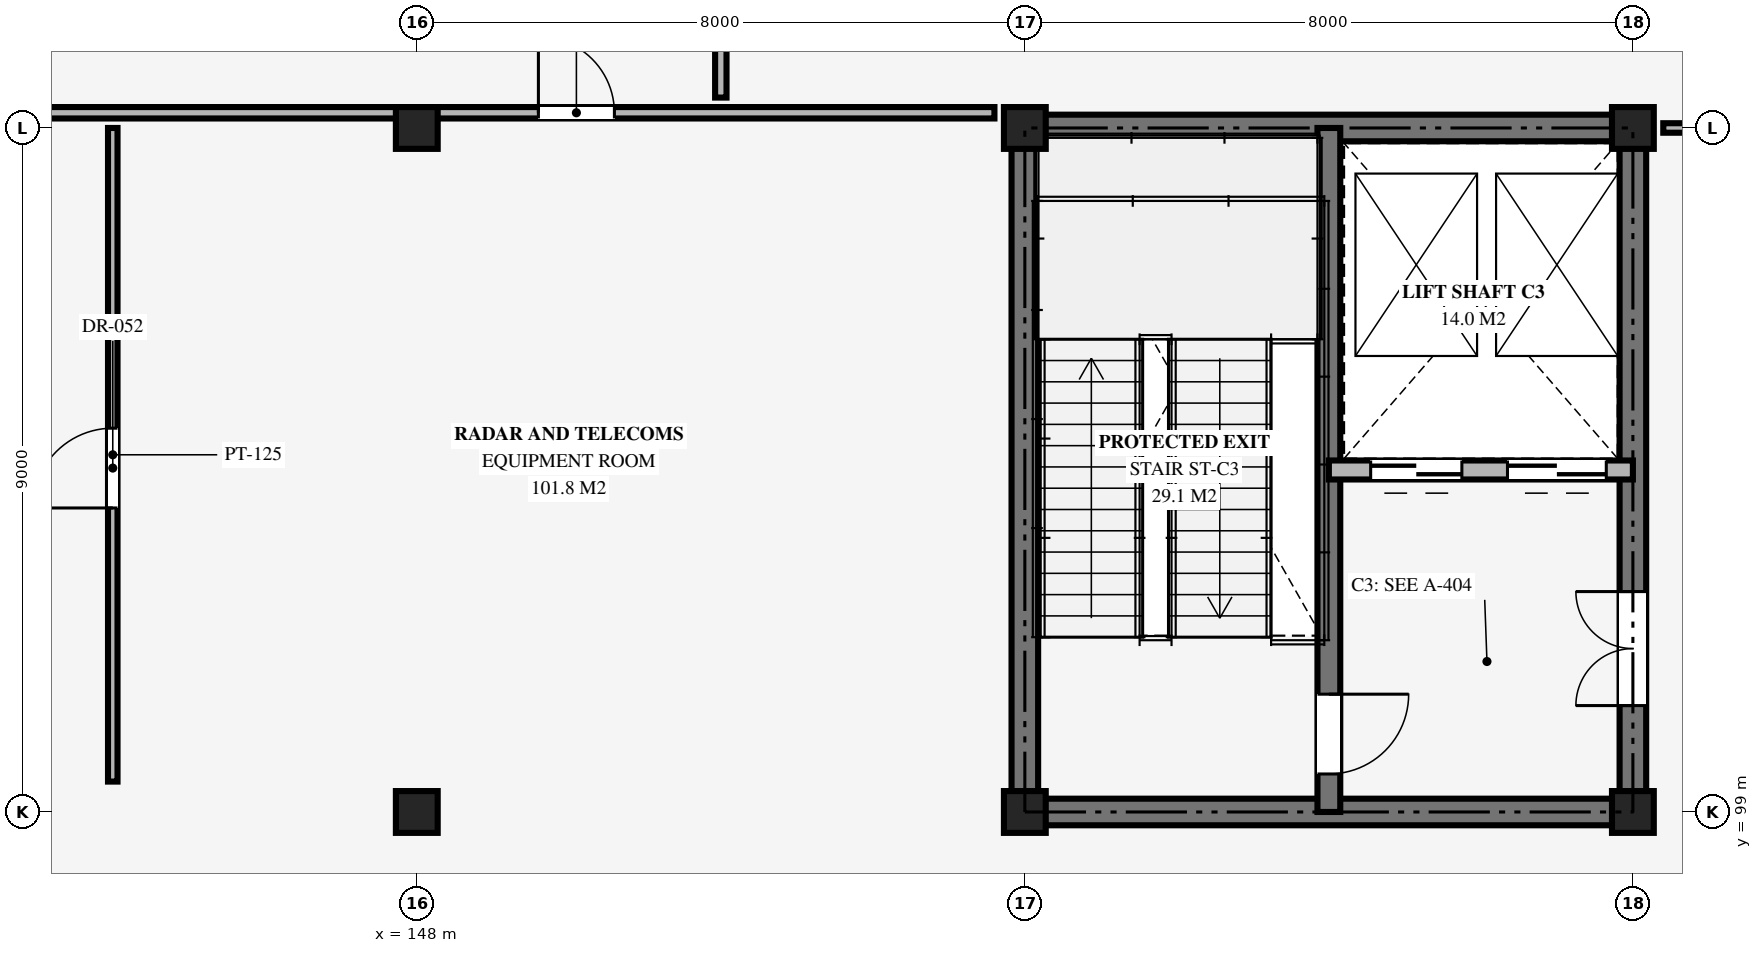
"""IFC4 building model, lengths in metres.
Left out: names, types, materials, properties, quantities, classifications, styles, units other than length and angle.
Written with IfcOpenShell. Run it as: python <this file> out.ifc"""

import sys

from ifc_helpers import new_model, si_unit, direction, frame, frame_2d, origin, origin_2d, place, context, subcontext, project, spatial, rectangle, extrude, element, fill, save


model = new_model("IFC4")
c1 = context("Model", 3, precision=1e-05, world=origin(), true_north=direction((0.0, 1.0)))
c2 = subcontext(c1, "Body", "Model", "MODEL_VIEW")
j1 = project(units=[si_unit("LENGTHUNIT", "METRE"), si_unit("PLANEANGLEUNIT", "RADIAN")], contexts=[c1])
p1 = place(None, origin())
s1 = spatial("IfcSite", under=j1, at=p1, CompositionType="ELEMENT")
p2 = place(p1, origin())
s2 = spatial("IfcBuilding", under=s1, at=p2, CompositionType="ELEMENT")
p3 = place(p2, frame((0.0, 0.0, 19.5)))
s3 = spatial("IfcBuildingStorey", under=s2, at=p3, CompositionType="ELEMENT", Elevation=19.5)
for number, where, z_axis, x_axis in (
    (1, (148.0, 99.0, 0.0), (0.0, 0.0, 1.0), (1.0, 0.0, 0.0)),
    (2, (148.0, 108.0, 0.0), (0.0, 0.0, 1.0), (1.0, 0.0, 0.0)),
    (3, (156.0, 99.0, 0.0), (0.0, 0.0, 1.0), (1.0, 0.0, 0.0)),
    (4, (156.0, 108.0, 0.0), (0.0, 0.0, 1.0), (1.0, 0.0, 0.0)),
    (5, (164.0, 99.0, 0.0), (0.0, 0.0, 1.0), (1.0, 0.0, 0.0)),
    (6, (164.0, 108.0, 0.0), (0.0, 0.0, 1.0), (1.0, 0.0, 0.0)),
):
    element("IfcColumn", number, at=place(p3, frame(where, z_axis=z_axis, x_axis=x_axis)), inside=s3, PredefinedType="COLUMN", context=c2, shape_type="SweptSolid", body=[
        extrude(rectangle(XDim=0.55, YDim=0.55, at=origin_2d()), origin(), (0.0, 0.0, 1.0), 4.04),
    ])
for number, where, z_axis, x_axis in (
    (7, (156.0, 99.0, 0.0), (0.0, 0.0, 1.0), (1.0, 0.0, 0.0)),
    (8, (156.0, 108.0, 0.0), (0.0, 0.0, 1.0), (1.0, 0.0, 0.0)),
):
    element("IfcWall", number, at=place(p3, frame(where, z_axis=z_axis, x_axis=x_axis)), inside=s3, PredefinedType="SHEAR", context=c2, shape_type="SweptSolid", body=[
        extrude(rectangle(XDim=8.0, YDim=0.35, at=frame_2d((4.0, 0.0))), origin(), (0.0, 0.0, 1.0), 4.18),
    ])
p4 = place(p3, frame((156.0, 99.0, 0.0), z_axis=(0.0, 0.0, 1.0), x_axis=(0.0, 1.0, 0.0)))
e9 = element("IfcWall", 9, at=p4, inside=s3, PredefinedType="SHEAR", context=c2, shape_type="SweptSolid", body=[
    extrude(rectangle(XDim=9.0, YDim=0.35, at=frame_2d((4.5, 0.0))), origin(), (0.0, 0.0, 1.0), 4.18),
])
p5 = place(p3, frame((164.0, 99.0, 0.0), z_axis=(0.0, 0.0, 1.0), x_axis=(0.0, 1.0, 0.0)))
e10 = element("IfcWall", 10, at=p5, inside=s3, PredefinedType="SHEAR", context=c2, shape_type="SweptSolid", body=[
    extrude(rectangle(XDim=9.0, YDim=0.35, at=frame_2d((4.5, 0.0))), origin(), (0.0, 0.0, 1.0), 4.18),
])
p6 = place(p5, frame((1.4, 0.0, 0.0)))
e11 = element("IfcOpeningElement", 11, at=p6, cuts=e10, PredefinedType="OPENING", context=c2, shape_type="SweptSolid", body=[
    extrude(rectangle(XDim=1.5, YDim=2.2, at=frame_2d((0.75, 1.1))), frame((0.0, 0.185, 0.0), z_axis=(0.0, -1.0, 0.0), x_axis=(1.0, 0.0, 0.0)), (0.0, 0.0, 1.0), 0.37),
])
p7 = place(p3, frame((160.0, 108.0, 0.0), z_axis=(0.0, 0.0, 1.0), x_axis=(0.0, -1.0, 0.0)))
e12 = element("IfcWall", 12, at=p7, inside=s3, PredefinedType="SHEAR", context=c2, shape_type="SweptSolid", body=[
    extrude(rectangle(XDim=9.0, YDim=0.3, at=frame_2d((4.5, 0.0))), origin(), (0.0, 0.0, 1.0), 4.18),
])
p8 = place(p7, frame((7.45, 0.0, 0.0)))
e13 = element("IfcOpeningElement", 13, at=p8, cuts=e12, PredefinedType="OPENING", context=c2, shape_type="SweptSolid", body=[
    extrude(rectangle(XDim=1.05, YDim=2.15, at=frame_2d((0.525, 1.075))), frame((0.0, 0.16, 0.0), z_axis=(0.0, -1.0, 0.0), x_axis=(1.0, 0.0, 0.0)), (0.0, 0.0, 1.0), 0.32),
])
p9 = place(p3, frame((164.0, 103.5, 0.0), z_axis=(0.0, 0.0, 1.0), x_axis=(-1.0, 0.0, 0.0)))
e14 = element("IfcWall", 14, at=p9, inside=s3, PredefinedType="SOLIDWALL", context=c2, shape_type="SweptSolid", body=[
    extrude(rectangle(XDim=4.0, YDim=0.25, at=frame_2d((2.0, 0.0))), origin(), (0.0, 0.0, 1.0), 3.2),
])
p10 = place(p9, frame((0.35, 0.0, 0.0)))
e15 = element("IfcOpeningElement", 15, at=p10, cuts=e14, PredefinedType="OPENING", context=c2, shape_type="SweptSolid", body=[
    extrude(rectangle(XDim=1.3, YDim=2.25, at=frame_2d((0.65, 1.125))), frame((0.0, 0.135, 0.0), z_axis=(0.0, -1.0, 0.0), x_axis=(1.0, 0.0, 0.0)), (0.0, 0.0, 1.0), 0.27),
])
p11 = place(p9, frame((2.25, 0.0, 0.0)))
e16 = element("IfcOpeningElement", 16, at=p11, cuts=e14, PredefinedType="OPENING", context=c2, shape_type="SweptSolid", body=[
    extrude(rectangle(XDim=1.2, YDim=2.2, at=frame_2d((0.6, 1.1))), frame((0.0, 0.135, 0.0), z_axis=(0.0, -1.0, 0.0), x_axis=(1.0, 0.0, 0.0)), (0.0, 0.0, 1.0), 0.27),
])
p12 = place(p3, frame((152.0, 108.4, 0.0), z_axis=(0.0, 0.0, 1.0), x_axis=(0.0, 1.0, 0.0)))
e17 = element("IfcWall", 17, at=p12, inside=s3, PredefinedType="PARTITIONING", context=c2, shape_type="SweptSolid", body=[
    extrude(rectangle(XDim=17.0, YDim=0.15, at=frame_2d((8.5, 0.0))), origin(), (0.0, 0.0, 1.0), 3.2),
])
p13 = place(p12, frame((6.5, 0.0, 0.0)))
e18 = element("IfcOpeningElement", 18, at=p13, cuts=e17, PredefinedType="OPENING", context=c2, shape_type="SweptSolid", body=[
    extrude(rectangle(XDim=1.05, YDim=2.15, at=frame_2d((0.525, 1.075))), frame((0.0, 0.085, 0.0), z_axis=(0.0, -1.0, 0.0), x_axis=(1.0, 0.0, 0.0)), (0.0, 0.0, 1.0), 0.17),
])
p14 = place(p3, frame((120.6, 108.2, 0.0), z_axis=(0.0, 0.0, 1.0), x_axis=(1.0, 0.0, 0.0)))
e19 = element("IfcWall", 19, at=p14, inside=s3, PredefinedType="PARTITIONING", context=c2, shape_type="SweptSolid", body=[
    extrude(rectangle(XDim=35.0, YDim=0.15, at=frame_2d((17.5, 0.0))), origin(), (0.0, 0.0, 1.0), 3.2),
])
p15 = place(p14, frame((8.0, 0.0, 0.0)))
e20 = element("IfcOpeningElement", 20, at=p15, cuts=e19, PredefinedType="OPENING", context=c2, shape_type="SweptSolid", body=[
    extrude(rectangle(XDim=1.4, YDim=2.15, at=frame_2d((0.7, 1.075))), frame((0.0, 0.085, 0.0), z_axis=(0.0, -1.0, 0.0), x_axis=(1.0, 0.0, 0.0)), (0.0, 0.0, 1.0), 0.17),
])
p16 = place(p14, frame((29.0, 0.0, 0.0)))
e21 = element("IfcOpeningElement", 21, at=p16, cuts=e19, PredefinedType="OPENING", context=c2, shape_type="SweptSolid", body=[
    extrude(rectangle(XDim=1.0, YDim=2.15, at=frame_2d((0.5, 1.075))), frame((0.0, 0.085, 0.0), z_axis=(0.0, -1.0, 0.0), x_axis=(1.0, 0.0, 0.0)), (0.0, 0.0, 1.0), 0.17),
])
p17 = place(p3, frame((144.0, 99.4, 0.0), z_axis=(0.0, 0.0, 1.0), x_axis=(0.0, 1.0, 0.0)))
e22 = element("IfcWall", 22, at=p17, inside=s3, PredefinedType="PARTITIONING", context=c2, shape_type="SweptSolid", body=[
    extrude(rectangle(XDim=8.6, YDim=0.125, at=frame_2d((4.3, 0.0))), origin(), (0.0, 0.0, 1.0), 3.2),
])
p18 = place(p17, frame((3.6, 0.0, 0.0)))
e23 = element("IfcOpeningElement", 23, at=p18, cuts=e22, PredefinedType="OPENING", context=c2, shape_type="SweptSolid", body=[
    extrude(rectangle(XDim=1.05, YDim=2.15, at=frame_2d((0.525, 1.075))), frame((0.0, 0.073, 0.0), z_axis=(0.0, -1.0, 0.0), x_axis=(1.0, 0.0, 0.0)), (0.0, 0.0, 1.0), 0.145),
])
p19 = place(p3, frame((164.4, 108.0, 0.0), z_axis=(0.0, 0.0, 1.0), x_axis=(1.0, 0.0, 0.0)))
e24 = element("IfcWall", 24, at=p19, inside=s3, PredefinedType="PARTITIONING", context=c2, shape_type="SweptSolid", body=[
    extrude(rectangle(XDim=15.0, YDim=0.125, at=frame_2d((7.5, 0.0))), origin(), (0.0, 0.0, 1.0), 3.2),
])
p20 = place(p19, frame((4.9, 0.0, 0.0)))
e25 = element("IfcOpeningElement", 25, at=p20, cuts=e24, PredefinedType="OPENING", context=c2, shape_type="SweptSolid", body=[
    extrude(rectangle(XDim=0.95, YDim=2.1, at=frame_2d((0.475, 1.05))), frame((0.0, 0.073, 0.0), z_axis=(0.0, -1.0, 0.0), x_axis=(1.0, 0.0, 0.0)), (0.0, 0.0, 1.0), 0.145),
])
p21 = place(p10, origin())
e26 = element("IfcDoor", 26, at=p21, inside=s3, OperationType="DOUBLE_DOOR_SLIDING", PredefinedType="USERDEFINED", context=c2, shape_type="SweptSolid", body=[
    extrude(rectangle(XDim=1.3, YDim=2.25, at=frame_2d((0.65, 1.125))), frame((0.0, 0.025, 0.0), z_axis=(0.0, -1.0, 0.0), x_axis=(1.0, 0.0, 0.0)), (0.0, 0.0, 1.0), 0.05),
])
fill(e15, e26)
p22 = place(p11, origin())
e27 = element("IfcDoor", 27, at=p22, inside=s3, OperationType="DOUBLE_DOOR_SLIDING", PredefinedType="USERDEFINED", context=c2, shape_type="SweptSolid", body=[
    extrude(rectangle(XDim=1.2, YDim=2.2, at=frame_2d((0.6, 1.1))), frame((0.0, 0.025, 0.0), z_axis=(0.0, -1.0, 0.0), x_axis=(1.0, 0.0, 0.0)), (0.0, 0.0, 1.0), 0.05),
])
fill(e16, e27)
p23 = place(p8, origin())
e28 = element("IfcDoor", 28, at=p23, inside=s3, OperationType="SINGLE_SWING_LEFT", PredefinedType="DOOR", context=c2, shape_type="SweptSolid", body=[
    extrude(rectangle(XDim=1.05, YDim=2.15, at=frame_2d((0.525, 1.075))), frame((0.0, 0.025, 0.0), z_axis=(0.0, -1.0, 0.0), x_axis=(1.0, 0.0, 0.0)), (0.0, 0.0, 1.0), 0.05),
])
fill(e13, e28)
p24 = place(p6, origin())
e29 = element("IfcDoor", 29, at=p24, inside=s3, OperationType="DOUBLE_DOOR_SINGLE_SWING", PredefinedType="DOOR", context=c2, shape_type="SweptSolid", body=[
    extrude(rectangle(XDim=1.5, YDim=2.2, at=frame_2d((0.75, 1.1))), frame((0.0, 0.025, 0.0), z_axis=(0.0, -1.0, 0.0), x_axis=(1.0, 0.0, 0.0)), (0.0, 0.0, 1.0), 0.05),
])
fill(e11, e29)
p25 = place(p16, origin())
e30 = element("IfcDoor", 30, at=p25, inside=s3, OperationType="SINGLE_SWING_LEFT", PredefinedType="DOOR", context=c2, shape_type="SweptSolid", body=[
    extrude(rectangle(XDim=1.0, YDim=2.15, at=frame_2d((0.5, 1.075))), frame((0.0, 0.025, 0.0), z_axis=(0.0, -1.0, 0.0), x_axis=(1.0, 0.0, 0.0)), (0.0, 0.0, 1.0), 0.05),
])
fill(e21, e30)
p26 = place(p18, origin())
e31 = element("IfcDoor", 31, at=p26, inside=s3, OperationType="SINGLE_SWING_LEFT", PredefinedType="DOOR", context=c2, shape_type="SweptSolid", body=[
    extrude(rectangle(XDim=1.05, YDim=2.15, at=frame_2d((0.525, 1.075))), frame((0.0, 0.025, 0.0), z_axis=(0.0, -1.0, 0.0), x_axis=(1.0, 0.0, 0.0)), (0.0, 0.0, 1.0), 0.05),
])
fill(e23, e31)
save(model, sys.argv[1])
